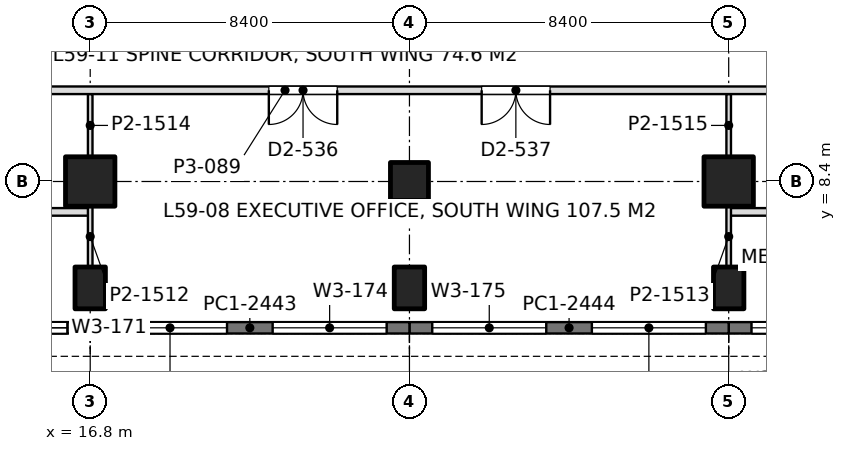
"""IFC4 building model, lengths in metres.
Left out: names, types, materials, properties, quantities, classifications, styles, units other than length and angle.
Written with IfcOpenShell. Run it as: python <this file> out.ifc"""

import sys

from ifc_helpers import new_model, si_unit, direction, frame, frame_2d, origin, origin_2d, place, context, subcontext, project, spatial, rectangle, extrude, element, fill, save


model = new_model("IFC4")
c1 = context("Model", 3, precision=1e-05, world=origin(), true_north=direction((0.0, 1.0)))
c2 = subcontext(c1, "Body", "Model", "MODEL_VIEW")
j1 = project(units=[si_unit("LENGTHUNIT", "METRE"), si_unit("PLANEANGLEUNIT", "RADIAN")], contexts=[c1])
p1 = place(None, origin())
s1 = spatial("IfcSite", under=j1, at=p1, CompositionType="ELEMENT")
p2 = place(p1, origin())
s2 = spatial("IfcBuilding", under=s1, at=p2, CompositionType="ELEMENT")
p3 = place(p2, frame((0.0, 0.0, 259.2)))
s3 = spatial("IfcBuildingStorey", under=s2, at=p3, CompositionType="ELEMENT", Elevation=259.2)
p4 = place(p3, frame((16.8, 5.6, 0.0), z_axis=(0.0, 0.0, 1.0), x_axis=(1.0, 0.0, 0.0)))
e1 = element("IfcColumn", 1, at=p4, inside=s3, PredefinedType="COLUMN", context=c2, shape_type="SweptSolid", body=[
    extrude(rectangle(XDim=0.8, YDim=1.1, at=origin_2d()), origin(), (0.0, 0.0, 1.0), 4.5),
])
p5 = place(p3, frame((16.8, 8.4, 0.0), z_axis=(0.0, 0.0, 1.0), x_axis=(1.0, 0.0, 0.0)))
e2 = element("IfcColumn", 2, at=p5, inside=s3, PredefinedType="COLUMN", context=c2, shape_type="SweptSolid", body=[
    extrude(rectangle(XDim=1.3, YDim=1.3, at=origin_2d()), origin(), (0.0, 0.0, 1.0), 4.5),
])
p6 = place(p3, frame((25.2, 5.6, 0.0), z_axis=(0.0, 0.0, 1.0), x_axis=(1.0, 0.0, 0.0)))
e3 = element("IfcColumn", 3, at=p6, inside=s3, PredefinedType="COLUMN", context=c2, shape_type="SweptSolid", body=[
    extrude(rectangle(XDim=0.8, YDim=1.1, at=origin_2d()), origin(), (0.0, 0.0, 1.0), 4.5),
])
p7 = place(p3, frame((25.2, 8.4, 0.0), z_axis=(0.0, 0.0, 1.0), x_axis=(1.0, 0.0, 0.0)))
e4 = element("IfcColumn", 4, at=p7, inside=s3, PredefinedType="COLUMN", context=c2, shape_type="SweptSolid", body=[
    extrude(rectangle(XDim=1.0, YDim=1.0, at=origin_2d()), origin(), (0.0, 0.0, 1.0), 4.5),
])
p8 = place(p3, frame((33.6, 5.6, 0.0), z_axis=(0.0, 0.0, 1.0), x_axis=(1.0, 0.0, 0.0)))
e5 = element("IfcColumn", 5, at=p8, inside=s3, PredefinedType="COLUMN", context=c2, shape_type="SweptSolid", body=[
    extrude(rectangle(XDim=0.8, YDim=1.1, at=origin_2d()), origin(), (0.0, 0.0, 1.0), 4.5),
])
p9 = place(p3, frame((33.6, 8.4, 0.0), z_axis=(0.0, 0.0, 1.0), x_axis=(1.0, 0.0, 0.0)))
e6 = element("IfcColumn", 6, at=p9, inside=s3, PredefinedType="COLUMN", context=c2, shape_type="SweptSolid", body=[
    extrude(rectangle(XDim=1.3, YDim=1.3, at=origin_2d()), origin(), (0.0, 0.0, 1.0), 4.5),
])
p10 = place(p3, frame((42.0, 4.55, 0.0), z_axis=(0.0, 0.0, 1.0), x_axis=(-1.0, 0.0, 0.0)))
e7 = element("IfcWall", 7, at=p10, inside=s3, PredefinedType="SOLIDWALL", context=c2, shape_type="SweptSolid", body=[
    extrude(rectangle(XDim=8.4, YDim=0.3, at=frame_2d((4.2, 0.0))), origin(), (0.0, 0.0, 1.0), 4.35),
])
p11 = place(p10, frame((0.6, 0.0, 0.9)))
e8 = element("IfcOpeningElement", 8, at=p11, cuts=e7, PredefinedType="OPENING", context=c2, shape_type="SweptSolid", body=[
    extrude(rectangle(XDim=3.0, YDim=2.4, at=frame_2d((1.5, 1.2))), frame((0.0, 0.16, 0.0), z_axis=(0.0, -1.0, 0.0), x_axis=(1.0, 0.0, 0.0)), (0.0, 0.0, 1.0), 0.32),
])
p12 = place(p10, frame((4.8, 0.0, 0.9)))
e9 = element("IfcOpeningElement", 9, at=p12, cuts=e7, PredefinedType="OPENING", context=c2, shape_type="SweptSolid", body=[
    extrude(rectangle(XDim=3.0, YDim=2.4, at=frame_2d((1.5, 1.2))), frame((0.0, 0.16, 0.0), z_axis=(0.0, -1.0, 0.0), x_axis=(1.0, 0.0, 0.0)), (0.0, 0.0, 1.0), 0.32),
])
p13 = place(p3, frame((33.6, 4.55, 0.0), z_axis=(0.0, 0.0, 1.0), x_axis=(-1.0, 0.0, 0.0)))
e10 = element("IfcWall", 10, at=p13, inside=s3, PredefinedType="SOLIDWALL", context=c2, shape_type="SweptSolid", body=[
    extrude(rectangle(XDim=8.4, YDim=0.3, at=frame_2d((4.2, 0.0))), origin(), (0.0, 0.0, 1.0), 4.35),
])
p14 = place(p13, frame((0.6, 0.0, 0.9)))
e11 = element("IfcOpeningElement", 11, at=p14, cuts=e10, PredefinedType="OPENING", context=c2, shape_type="SweptSolid", body=[
    extrude(rectangle(XDim=3.0, YDim=2.4, at=frame_2d((1.5, 1.2))), frame((0.0, 0.16, 0.0), z_axis=(0.0, -1.0, 0.0), x_axis=(1.0, 0.0, 0.0)), (0.0, 0.0, 1.0), 0.32),
])
p15 = place(p13, frame((4.8, 0.0, 0.9)))
e12 = element("IfcOpeningElement", 12, at=p15, cuts=e10, PredefinedType="OPENING", context=c2, shape_type="SweptSolid", body=[
    extrude(rectangle(XDim=3.0, YDim=2.4, at=frame_2d((1.5, 1.2))), frame((0.0, 0.16, 0.0), z_axis=(0.0, -1.0, 0.0), x_axis=(1.0, 0.0, 0.0)), (0.0, 0.0, 1.0), 0.32),
])
p16 = place(p3, frame((25.2, 4.55, 0.0), z_axis=(0.0, 0.0, 1.0), x_axis=(-1.0, 0.0, 0.0)))
e13 = element("IfcWall", 13, at=p16, inside=s3, PredefinedType="SOLIDWALL", context=c2, shape_type="SweptSolid", body=[
    extrude(rectangle(XDim=8.4, YDim=0.3, at=frame_2d((4.2, 0.0))), origin(), (0.0, 0.0, 1.0), 4.35),
])
p17 = place(p16, frame((0.6, 0.0, 0.9)))
e14 = element("IfcOpeningElement", 14, at=p17, cuts=e13, PredefinedType="OPENING", context=c2, shape_type="SweptSolid", body=[
    extrude(rectangle(XDim=3.0, YDim=2.4, at=frame_2d((1.5, 1.2))), frame((0.0, 0.16, 0.0), z_axis=(0.0, -1.0, 0.0), x_axis=(1.0, 0.0, 0.0)), (0.0, 0.0, 1.0), 0.32),
])
p18 = place(p16, frame((4.8, 0.0, 0.9)))
e15 = element("IfcOpeningElement", 15, at=p18, cuts=e13, PredefinedType="OPENING", context=c2, shape_type="SweptSolid", body=[
    extrude(rectangle(XDim=3.0, YDim=2.4, at=frame_2d((1.5, 1.2))), frame((0.0, 0.16, 0.0), z_axis=(0.0, -1.0, 0.0), x_axis=(1.0, 0.0, 0.0)), (0.0, 0.0, 1.0), 0.32),
])
p19 = place(p3, frame((16.8, 4.55, 0.0), z_axis=(0.0, 0.0, 1.0), x_axis=(-1.0, 0.0, 0.0)))
e16 = element("IfcWall", 16, at=p19, inside=s3, PredefinedType="SOLIDWALL", context=c2, shape_type="SweptSolid", body=[
    extrude(rectangle(XDim=8.4, YDim=0.3, at=frame_2d((4.2, 0.0))), origin(), (0.0, 0.0, 1.0), 4.35),
])
p20 = place(p19, frame((0.6, 0.0, 0.9)))
e17 = element("IfcOpeningElement", 17, at=p20, cuts=e16, PredefinedType="OPENING", context=c2, shape_type="SweptSolid", body=[
    extrude(rectangle(XDim=3.0, YDim=2.4, at=frame_2d((1.5, 1.2))), frame((0.0, 0.16, 0.0), z_axis=(0.0, -1.0, 0.0), x_axis=(1.0, 0.0, 0.0)), (0.0, 0.0, 1.0), 0.32),
])
p21 = place(p19, frame((4.8, 0.0, 0.9)))
e18 = element("IfcOpeningElement", 18, at=p21, cuts=e16, PredefinedType="OPENING", context=c2, shape_type="SweptSolid", body=[
    extrude(rectangle(XDim=3.0, YDim=2.4, at=frame_2d((1.5, 1.2))), frame((0.0, 0.16, 0.0), z_axis=(0.0, -1.0, 0.0), x_axis=(1.0, 0.0, 0.0)), (0.0, 0.0, 1.0), 0.32),
])
p22 = place(p3, frame((-0.902, 7.6, 0.0), z_axis=(0.0, 0.0, 1.0), x_axis=(1.0, 0.0, 0.0)))
e19 = element("IfcWall", 19, at=p22, inside=s3, PredefinedType="PARTITIONING", context=c2, shape_type="SweptSolid", body=[
    extrude(rectangle(XDim=17.702, YDim=0.2, at=frame_2d((8.851, 0.0))), origin(), (0.0, 0.0, 1.0), 3.86),
])
p23 = place(p22, frame((2.002, 0.0, 0.0)))
e20 = element("IfcOpeningElement", 20, at=p23, cuts=e19, PredefinedType="OPENING", context=c2, shape_type="SweptSolid", body=[
    extrude(rectangle(XDim=1.1, YDim=2.4, at=frame_2d((0.55, 1.2))), frame((0.0, 0.11, 0.0), z_axis=(0.0, -1.0, 0.0), x_axis=(1.0, 0.0, 0.0)), (0.0, 0.0, 1.0), 0.22),
])
p24 = place(p22, frame((6.652, 0.0, 0.0)))
e21 = element("IfcOpeningElement", 21, at=p24, cuts=e19, PredefinedType="OPENING", context=c2, shape_type="SweptSolid", body=[
    extrude(rectangle(XDim=1.1, YDim=2.4, at=frame_2d((0.55, 1.2))), frame((0.0, 0.11, 0.0), z_axis=(0.0, -1.0, 0.0), x_axis=(1.0, 0.0, 0.0)), (0.0, 0.0, 1.0), 0.22),
])
p25 = place(p22, frame((10.852, 0.0, 0.0)))
e22 = element("IfcOpeningElement", 22, at=p25, cuts=e19, PredefinedType="OPENING", context=c2, shape_type="SweptSolid", body=[
    extrude(rectangle(XDim=1.1, YDim=2.4, at=frame_2d((0.55, 1.2))), frame((0.0, 0.11, 0.0), z_axis=(0.0, -1.0, 0.0), x_axis=(1.0, 0.0, 0.0)), (0.0, 0.0, 1.0), 0.22),
])
p26 = place(p22, frame((15.052, 0.0, 0.0)))
e23 = element("IfcOpeningElement", 23, at=p26, cuts=e19, PredefinedType="OPENING", context=c2, shape_type="SweptSolid", body=[
    extrude(rectangle(XDim=1.1, YDim=2.4, at=frame_2d((0.55, 1.2))), frame((0.0, 0.11, 0.0), z_axis=(0.0, -1.0, 0.0), x_axis=(1.0, 0.0, 0.0)), (0.0, 0.0, 1.0), 0.22),
])
p27 = place(p3, frame((16.8, 6.149, 0.0), z_axis=(0.0, 0.0, 1.0), x_axis=(0.0, 1.0, 0.0)))
e24 = element("IfcWall", 24, at=p27, inside=s3, PredefinedType="PARTITIONING", context=c2, shape_type="SweptSolid", body=[
    extrude(rectangle(XDim=1.603, YDim=0.12, at=frame_2d((0.802, 0.0))), origin(), (0.0, 0.0, 1.0), 3.99),
])
p28 = place(p3, frame((33.6, 7.6, 0.0), z_axis=(0.0, 0.0, 1.0), x_axis=(1.0, 0.0, 0.0)))
e25 = element("IfcWall", 25, at=p28, inside=s3, PredefinedType="PARTITIONING", context=c2, shape_type="SweptSolid", body=[
    extrude(rectangle(XDim=17.702, YDim=0.2, at=frame_2d((8.851, 0.0))), origin(), (0.0, 0.0, 1.0), 3.86),
])
p29 = place(p28, frame((3.3, 0.0, 0.0)))
e26 = element("IfcOpeningElement", 26, at=p29, cuts=e25, PredefinedType="OPENING", context=c2, shape_type="SweptSolid", body=[
    extrude(rectangle(XDim=1.8, YDim=2.2, at=frame_2d((0.9, 1.1))), frame((0.0, 0.11, 0.0), z_axis=(0.0, -1.0, 0.0), x_axis=(1.0, 0.0, 0.0)), (0.0, 0.0, 1.0), 0.22),
])
p30 = place(p28, frame((9.95, 0.0, 0.0)))
e27 = element("IfcOpeningElement", 27, at=p30, cuts=e25, PredefinedType="OPENING", context=c2, shape_type="SweptSolid", body=[
    extrude(rectangle(XDim=1.1, YDim=2.4, at=frame_2d((0.55, 1.2))), frame((0.0, 0.11, 0.0), z_axis=(0.0, -1.0, 0.0), x_axis=(1.0, 0.0, 0.0)), (0.0, 0.0, 1.0), 0.22),
])
p31 = place(p28, frame((14.6, 0.0, 0.0)))
e28 = element("IfcOpeningElement", 28, at=p31, cuts=e25, PredefinedType="OPENING", context=c2, shape_type="SweptSolid", body=[
    extrude(rectangle(XDim=1.1, YDim=2.4, at=frame_2d((0.55, 1.2))), frame((0.0, 0.11, 0.0), z_axis=(0.0, -1.0, 0.0), x_axis=(1.0, 0.0, 0.0)), (0.0, 0.0, 1.0), 0.22),
])
p32 = place(p3, frame((33.6, 6.149, 0.0), z_axis=(0.0, 0.0, 1.0), x_axis=(0.0, 1.0, 0.0)))
e29 = element("IfcWall", 29, at=p32, inside=s3, PredefinedType="PARTITIONING", context=c2, shape_type="SweptSolid", body=[
    extrude(rectangle(XDim=1.603, YDim=0.12, at=frame_2d((0.802, 0.0))), origin(), (0.0, 0.0, 1.0), 3.99),
])
for number, where, z_axis, x_axis in (
    (30, (16.8, 9.049, 0.0), (0.0, 0.0, 1.0), (0.0, 1.0, 0.0)),
    (31, (33.6, 9.049, 0.0), (0.0, 0.0, 1.0), (0.0, 1.0, 0.0)),
):
    element("IfcWall", number, at=place(p3, frame(where, z_axis=z_axis, x_axis=x_axis)), inside=s3, PredefinedType="PARTITIONING", context=c2, shape_type="SweptSolid", body=[
        extrude(rectangle(XDim=1.653, YDim=0.12, at=frame_2d((0.826, 0.0))), origin(), (0.0, 0.0, 1.0), 3.99),
    ])
p33 = place(p3, frame((1.2, 10.8, 0.0), z_axis=(0.0, 0.0, 1.0), x_axis=(1.0, 0.0, 0.0)))
e32 = element("IfcWall", 32, at=p33, inside=s3, PredefinedType="PARTITIONING", context=c2, shape_type="SweptSolid", body=[
    extrude(rectangle(XDim=41.452, YDim=0.2, at=frame_2d((20.726, 0.0))), origin(), (0.0, 0.0, 1.0), 3.8),
])
p34 = place(p33, frame((4.3, 0.0, 0.0)))
e33 = element("IfcOpeningElement", 33, at=p34, cuts=e32, PredefinedType="OPENING", context=c2, shape_type="SweptSolid", body=[
    extrude(rectangle(XDim=1.8, YDim=2.2, at=frame_2d((0.9, 1.1))), frame((0.0, 0.11, 0.0), z_axis=(0.0, -1.0, 0.0), x_axis=(1.0, 0.0, 0.0)), (0.0, 0.0, 1.0), 0.22),
])
p35 = place(p33, frame((9.5, 0.0, 0.0)))
e34 = element("IfcOpeningElement", 34, at=p35, cuts=e32, PredefinedType="OPENING", context=c2, shape_type="SweptSolid", body=[
    extrude(rectangle(XDim=1.8, YDim=2.2, at=frame_2d((0.9, 1.1))), frame((0.0, 0.11, 0.0), z_axis=(0.0, -1.0, 0.0), x_axis=(1.0, 0.0, 0.0)), (0.0, 0.0, 1.0), 0.22),
])
p36 = place(p33, frame((20.3, 0.0, 0.0)))
e35 = element("IfcOpeningElement", 35, at=p36, cuts=e32, PredefinedType="OPENING", context=c2, shape_type="SweptSolid", body=[
    extrude(rectangle(XDim=1.8, YDim=2.2, at=frame_2d((0.9, 1.1))), frame((0.0, 0.11, 0.0), z_axis=(0.0, -1.0, 0.0), x_axis=(1.0, 0.0, 0.0)), (0.0, 0.0, 1.0), 0.22),
])
p37 = place(p33, frame((25.9, 0.0, 0.0)))
e36 = element("IfcOpeningElement", 36, at=p37, cuts=e32, PredefinedType="OPENING", context=c2, shape_type="SweptSolid", body=[
    extrude(rectangle(XDim=1.8, YDim=2.2, at=frame_2d((0.9, 1.1))), frame((0.0, 0.11, 0.0), z_axis=(0.0, -1.0, 0.0), x_axis=(1.0, 0.0, 0.0)), (0.0, 0.0, 1.0), 0.22),
])
p38 = place(p33, frame((34.517, 0.0, 0.0)))
e37 = element("IfcOpeningElement", 37, at=p38, cuts=e32, PredefinedType="OPENING", context=c2, shape_type="SweptSolid", body=[
    extrude(rectangle(XDim=1.8, YDim=2.2, at=frame_2d((0.9, 1.1))), frame((0.0, 0.11, 0.0), z_axis=(0.0, -1.0, 0.0), x_axis=(1.0, 0.0, 0.0)), (0.0, 0.0, 1.0), 0.22),
])
p39 = place(p33, frame((37.533, 0.0, 0.0)))
e38 = element("IfcOpeningElement", 38, at=p39, cuts=e32, PredefinedType="OPENING", context=c2, shape_type="SweptSolid", body=[
    extrude(rectangle(XDim=1.8, YDim=2.2, at=frame_2d((0.9, 1.1))), frame((0.0, 0.11, 0.0), z_axis=(0.0, -1.0, 0.0), x_axis=(1.0, 0.0, 0.0)), (0.0, 0.0, 1.0), 0.22),
])
p40 = place(p12, origin())
e39 = element("IfcWindow", 39, at=p40, inside=s3, PartitioningType="SINGLE_PANEL", PredefinedType="WINDOW", context=c2, shape_type="SweptSolid", body=[
    extrude(rectangle(XDim=3.0, YDim=2.4, at=frame_2d((1.5, 1.2))), frame((0.0, 0.03, 0.0), z_axis=(0.0, -1.0, 0.0), x_axis=(1.0, 0.0, 0.0)), (0.0, 0.0, 1.0), 0.06),
])
fill(e9, e39)
p41 = place(p14, origin())
e40 = element("IfcWindow", 40, at=p41, inside=s3, PartitioningType="SINGLE_PANEL", PredefinedType="WINDOW", context=c2, shape_type="SweptSolid", body=[
    extrude(rectangle(XDim=3.0, YDim=2.4, at=frame_2d((1.5, 1.2))), frame((0.0, 0.03, 0.0), z_axis=(0.0, -1.0, 0.0), x_axis=(1.0, 0.0, 0.0)), (0.0, 0.0, 1.0), 0.06),
])
fill(e11, e40)
p42 = place(p15, origin())
e41 = element("IfcWindow", 41, at=p42, inside=s3, PartitioningType="SINGLE_PANEL", PredefinedType="WINDOW", context=c2, shape_type="SweptSolid", body=[
    extrude(rectangle(XDim=3.0, YDim=2.4, at=frame_2d((1.5, 1.2))), frame((0.0, 0.03, 0.0), z_axis=(0.0, -1.0, 0.0), x_axis=(1.0, 0.0, 0.0)), (0.0, 0.0, 1.0), 0.06),
])
fill(e12, e41)
p43 = place(p17, origin())
e42 = element("IfcWindow", 42, at=p43, inside=s3, PartitioningType="SINGLE_PANEL", PredefinedType="WINDOW", context=c2, shape_type="SweptSolid", body=[
    extrude(rectangle(XDim=3.0, YDim=2.4, at=frame_2d((1.5, 1.2))), frame((0.0, 0.03, 0.0), z_axis=(0.0, -1.0, 0.0), x_axis=(1.0, 0.0, 0.0)), (0.0, 0.0, 1.0), 0.06),
])
fill(e14, e42)
p44 = place(p18, origin())
e43 = element("IfcWindow", 43, at=p44, inside=s3, PartitioningType="SINGLE_PANEL", PredefinedType="WINDOW", context=c2, shape_type="SweptSolid", body=[
    extrude(rectangle(XDim=3.0, YDim=2.4, at=frame_2d((1.5, 1.2))), frame((0.0, 0.03, 0.0), z_axis=(0.0, -1.0, 0.0), x_axis=(1.0, 0.0, 0.0)), (0.0, 0.0, 1.0), 0.06),
])
fill(e15, e43)
p45 = place(p20, origin())
e44 = element("IfcWindow", 44, at=p45, inside=s3, PartitioningType="SINGLE_PANEL", PredefinedType="WINDOW", context=c2, shape_type="SweptSolid", body=[
    extrude(rectangle(XDim=3.0, YDim=2.4, at=frame_2d((1.5, 1.2))), frame((0.0, 0.03, 0.0), z_axis=(0.0, -1.0, 0.0), x_axis=(1.0, 0.0, 0.0)), (0.0, 0.0, 1.0), 0.06),
])
fill(e17, e44)
p46 = place(p36, frame((1.8, 0.0, 0.0), z_axis=(0.0, 0.0, 1.0), x_axis=(-1.0, 0.0, 0.0)))
e45 = element("IfcDoor", 45, at=p46, inside=s3, OperationType="DOUBLE_DOOR_SINGLE_SWING", PredefinedType="DOOR", context=c2, shape_type="SweptSolid", body=[
    extrude(rectangle(XDim=1.8, YDim=2.2, at=frame_2d((0.9, 1.1))), frame((0.0, 0.025, 0.0), z_axis=(0.0, -1.0, 0.0), x_axis=(1.0, 0.0, 0.0)), (0.0, 0.0, 1.0), 0.05),
])
fill(e35, e45)
p47 = place(p37, frame((1.8, 0.0, 0.0), z_axis=(0.0, 0.0, 1.0), x_axis=(-1.0, 0.0, 0.0)))
e46 = element("IfcDoor", 46, at=p47, inside=s3, OperationType="DOUBLE_DOOR_SINGLE_SWING", PredefinedType="DOOR", context=c2, shape_type="SweptSolid", body=[
    extrude(rectangle(XDim=1.8, YDim=2.2, at=frame_2d((0.9, 1.1))), frame((0.0, 0.025, 0.0), z_axis=(0.0, -1.0, 0.0), x_axis=(1.0, 0.0, 0.0)), (0.0, 0.0, 1.0), 0.05),
])
fill(e36, e46)
save(model, sys.argv[1])
